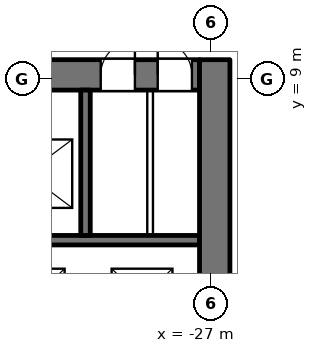
"""IFC4 building model, lengths in metres.
Left out: names, types, materials, properties, quantities, classifications, styles, units other than length and angle.
Written with IfcOpenShell. Run it as: python <this file> out.ifc"""

import sys

from ifc_helpers import new_model, si_unit, direction, frame, frame_2d, origin, place, context, subcontext, project, spatial, rectangle, extrude, element, fill, save


model = new_model("IFC4")
c1 = context("Model", 3, precision=1e-05, world=origin(), true_north=direction((0.0, 1.0)))
c2 = subcontext(c1, "Body", "Model", "MODEL_VIEW")
j1 = project(units=[si_unit("LENGTHUNIT", "METRE"), si_unit("PLANEANGLEUNIT", "RADIAN")], contexts=[c1])
p1 = place(None, origin())
s1 = spatial("IfcSite", under=j1, at=p1, CompositionType="ELEMENT")
p2 = place(p1, origin())
s2 = spatial("IfcBuilding", under=s1, at=p2, CompositionType="ELEMENT")
p3 = place(p2, frame((0.0, 0.0, 12.6)))
s3 = spatial("IfcBuildingStorey", under=s2, at=p3, CompositionType="ELEMENT", Elevation=12.6)
p4 = place(p3, frame((-44.7, 4.75, 0.0), z_axis=(0.0, 0.0, 1.0), x_axis=(1.0, 0.0, 0.0)))
e1 = element("IfcWall", 1, at=p4, inside=s3, PredefinedType="SHEAR", context=c2, shape_type="SweptSolid", body=[
    extrude(rectangle(XDim=17.4, YDim=0.25, at=frame_2d((8.7, 0.0))), origin(), (0.0, 0.0, 1.0), 5.1),
])
p5 = place(p3, frame((-44.7, 9.1, 0.0), z_axis=(0.0, 0.0, 1.0), x_axis=(1.0, 0.0, 0.0)))
e2 = element("IfcWall", 2, at=p5, inside=s3, PredefinedType="SHEAR", context=c2, shape_type="SweptSolid", body=[
    extrude(rectangle(XDim=17.4, YDim=0.8, at=frame_2d((8.7, 0.0))), origin(), (0.0, 0.0, 1.0), 5.1),
])
p6 = place(p5, frame((8.9, 0.0, 0.0)))
e3 = element("IfcOpeningElement", 3, at=p6, cuts=e2, PredefinedType="OPENING", context=c2, shape_type="SweptSolid", body=[
    extrude(rectangle(XDim=1.2, YDim=2.1, at=frame_2d((0.6, 1.05))), frame((0.0, 0.41, 0.0), z_axis=(0.0, -1.0, 0.0), x_axis=(1.0, 0.0, 0.0)), (0.0, 0.0, 1.0), 0.82),
])
p7 = place(p5, frame((14.8, 0.0, 0.0)))
e4 = element("IfcOpeningElement", 4, at=p7, cuts=e2, PredefinedType="OPENING", context=c2, shape_type="SweptSolid", body=[
    extrude(rectangle(XDim=0.9, YDim=2.1, at=frame_2d((0.45, 1.05))), frame((0.0, 0.41, 0.0), z_axis=(0.0, -1.0, 0.0), x_axis=(1.0, 0.0, 0.0)), (0.0, 0.0, 1.0), 0.82),
])
p8 = place(p5, frame((16.3, 0.0, 0.0)))
e5 = element("IfcOpeningElement", 5, at=p8, cuts=e2, PredefinedType="OPENING", context=c2, shape_type="SweptSolid", body=[
    extrude(rectangle(XDim=0.9, YDim=2.1, at=frame_2d((0.45, 1.05))), frame((0.0, 0.41, 0.0), z_axis=(0.0, -1.0, 0.0), x_axis=(1.0, 0.0, 0.0)), (0.0, 0.0, 1.0), 0.82),
])
p9 = place(p3, frame((-30.3, 4.875, 0.0), z_axis=(0.0, 0.0, 1.0), x_axis=(0.0, 1.0, 0.0)))
e6 = element("IfcWall", 6, at=p9, inside=s3, PredefinedType="SHEAR", context=c2, shape_type="SweptSolid", body=[
    extrude(rectangle(XDim=3.825, YDim=0.25, at=frame_2d((1.913, 0.0))), origin(), (0.0, 0.0, 1.0), 5.1),
])
p10 = place(p3, frame((-28.6, 4.875, 0.0), z_axis=(0.0, 0.0, 1.0), x_axis=(0.0, 1.0, 0.0)))
e7 = element("IfcWall", 7, at=p10, inside=s3, PredefinedType="PARTITIONING", context=c2, shape_type="SweptSolid", body=[
    extrude(rectangle(XDim=3.825, YDim=0.15, at=frame_2d((1.913, 0.0))), origin(), (0.0, 0.0, 1.0), 5.1),
])
p11 = place(p3, frame((-26.9, -9.5, 0.0), z_axis=(0.0, 0.0, 1.0), x_axis=(0.0, 1.0, 0.0)))
e8 = element("IfcWall", 8, at=p11, inside=s3, PredefinedType="SHEAR", context=c2, shape_type="SweptSolid", body=[
    extrude(rectangle(XDim=19.0, YDim=0.8, at=frame_2d((9.5, 0.0))), origin(), (0.0, 0.0, 1.0), 5.1),
])
p12 = place(p11, frame((8.3, 0.0, 0.0)))
e9 = element("IfcOpeningElement", 9, at=p12, cuts=e8, PredefinedType="OPENING", context=c2, shape_type="SweptSolid", body=[
    extrude(rectangle(XDim=2.4, YDim=2.1, at=frame_2d((1.2, 1.05))), frame((0.0, 0.41, 0.0), z_axis=(0.0, -1.0, 0.0), x_axis=(1.0, 0.0, 0.0)), (0.0, 0.0, 1.0), 0.82),
])
p13 = place(p7, origin())
e10 = element("IfcDoor", 10, at=p13, inside=s3, OperationType="SINGLE_SWING_RIGHT", PredefinedType="DOOR", context=c2, shape_type="SweptSolid", body=[
    extrude(rectangle(XDim=0.9, YDim=2.1, at=frame_2d((0.45, 1.05))), frame((0.0, -0.225, 0.0), z_axis=(0.0, -1.0, 0.0), x_axis=(1.0, 0.0, 0.0)), (0.0, 0.0, 1.0), 0.05),
])
fill(e4, e10)
p14 = place(p8, origin())
e11 = element("IfcDoor", 11, at=p14, inside=s3, OperationType="SINGLE_SWING_LEFT", PredefinedType="DOOR", context=c2, shape_type="SweptSolid", body=[
    extrude(rectangle(XDim=0.9, YDim=2.1, at=frame_2d((0.45, 1.05))), frame((0.0, -0.225, 0.0), z_axis=(0.0, -1.0, 0.0), x_axis=(1.0, 0.0, 0.0)), (0.0, 0.0, 1.0), 0.05),
])
fill(e5, e11)
save(model, sys.argv[1])
